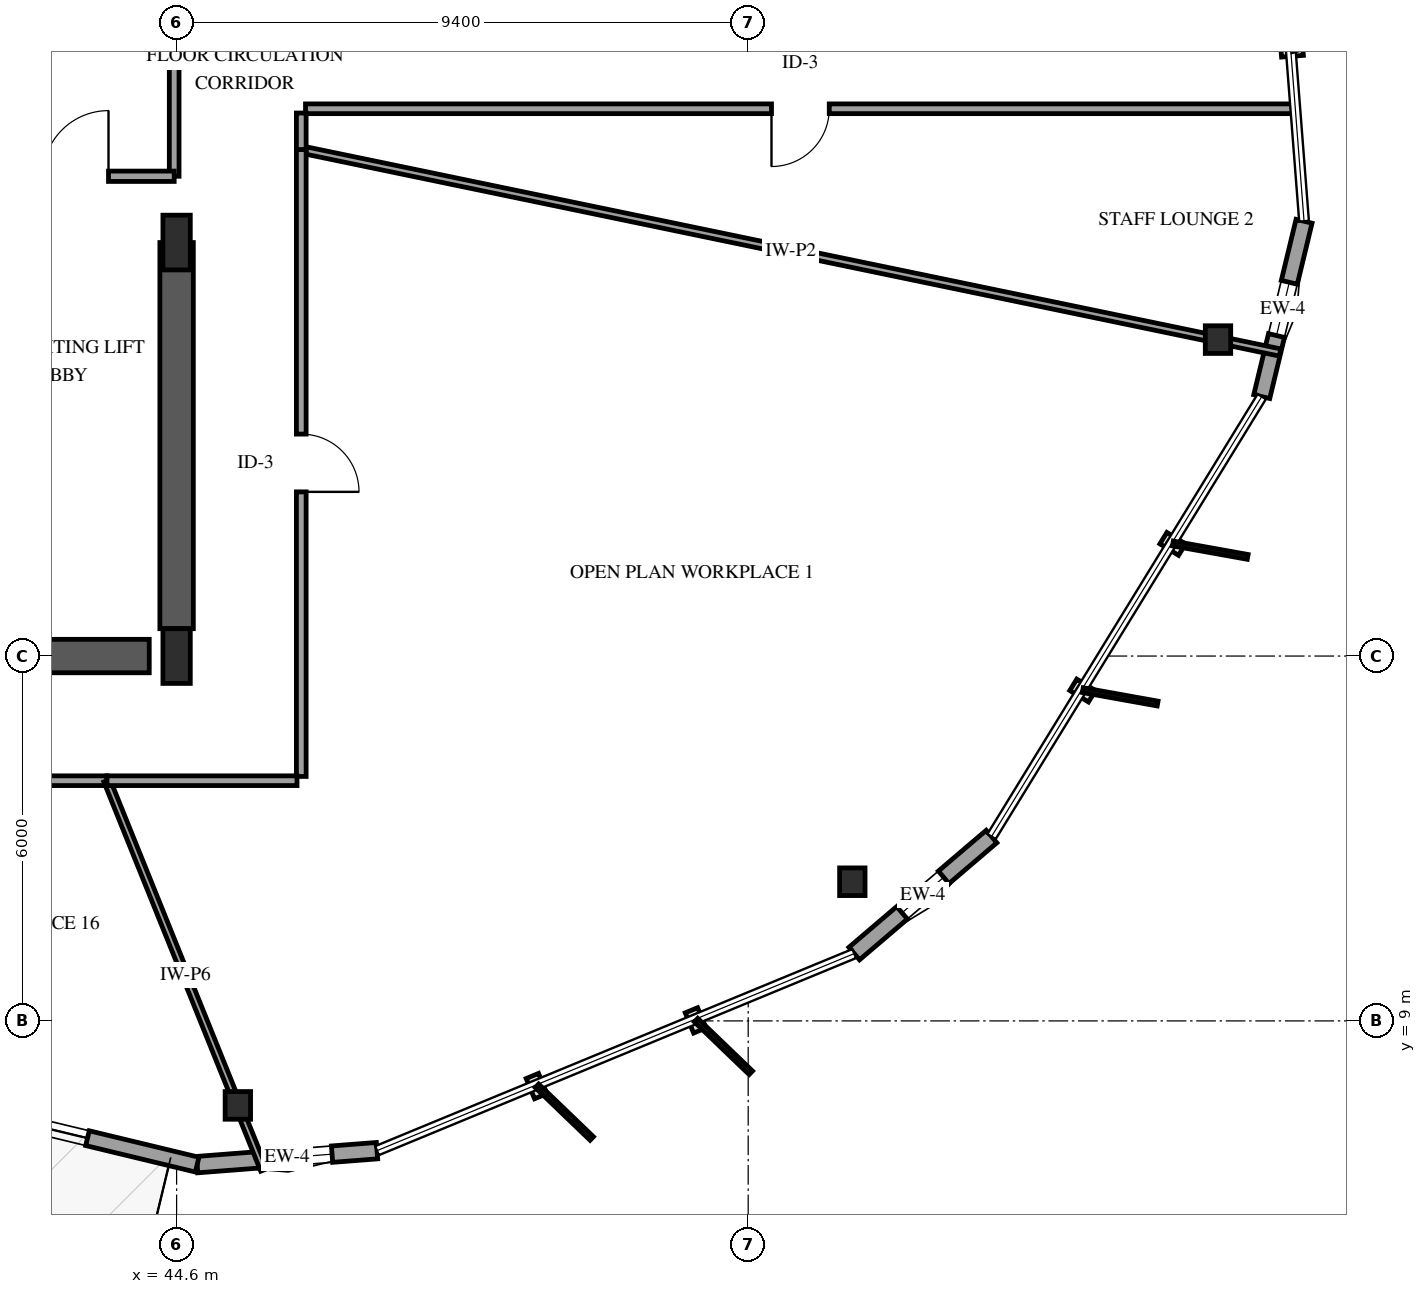
"""IFC4 building model, lengths in metres.
Left out: names, types, materials, properties, quantities, classifications, styles, units other than length and angle.
Written with IfcOpenShell. Run it as: python <this file> out.ifc"""

import sys

from ifc_helpers import new_model, si_unit, direction, frame, frame_2d, origin, origin_2d, place, context, subcontext, project, spatial, rectangle, i_section, extrude, element, fill, save


model = new_model("IFC4")
c1 = context("Model", 3, precision=1e-05, world=origin(), true_north=direction((0.0, 1.0)))
c2 = subcontext(c1, "Body", "Model", "MODEL_VIEW")
j1 = project(units=[si_unit("LENGTHUNIT", "METRE"), si_unit("PLANEANGLEUNIT", "RADIAN")], contexts=[c1])
p1 = place(None, origin())
s1 = spatial("IfcSite", under=j1, at=p1, CompositionType="ELEMENT")
p2 = place(p1, origin())
s2 = spatial("IfcBuilding", under=s1, at=p2, CompositionType="ELEMENT")
p3 = place(p2, frame((0.0, 0.0, 114.7)))
s3 = spatial("IfcBuildingStorey", under=s2, at=p3, CompositionType="ELEMENT", Elevation=114.7)
p4 = place(p3, frame((41.3, 15.0, 0.0), z_axis=(0.0, 0.0, 1.0), x_axis=(1.0, 0.0, 0.0)))
e1 = element("IfcWall", 1, at=p4, inside=s3, PredefinedType="SHEAR", context=c2, shape_type="SweptSolid", body=[
    extrude(rectangle(XDim=2.85, YDim=0.55, at=frame_2d((1.425, 0.0))), origin(), (0.0, 0.0, 1.0), 3.9),
])
p5 = place(p3, frame((44.6, 15.45, 0.0), z_axis=(0.0, 0.0, 1.0), x_axis=(0.0, 1.0, 0.0)))
e2 = element("IfcWall", 2, at=p5, inside=s3, PredefinedType="SHEAR", context=c2, shape_type="SweptSolid", body=[
    extrude(rectangle(XDim=6.35, YDim=0.55, at=frame_2d((3.175, 0.0))), origin(), (0.0, 0.0, 1.0), 3.9),
])
for number, where, z_axis, x_axis in (
    (3, (44.6, 15.0, 0.0), (0.0, 0.0, 1.0), (1.0, 0.0, 0.0)),
    (4, (44.6, 21.8, 0.0), (0.0, 0.0, 1.0), (1.0, 0.0, 0.0)),
):
    element("IfcColumn", number, at=place(p3, frame(where, z_axis=z_axis, x_axis=x_axis)), inside=s3, PredefinedType="PILASTER", context=c2, shape_type="SweptSolid", body=[
        extrude(rectangle(XDim=0.45, YDim=0.9, at=origin_2d()), origin(), (0.0, 0.0, 1.0), 3.9),
    ])
for number, where, z_axis, x_axis in (
    (5, (45.607, 7.611, 0.0), (0.0, 0.0, 1.0), (1.0, 0.0, 0.0)),
    (6, (55.712, 11.289, 0.0), (0.0, 0.0, 1.0), (1.0, 0.0, 0.0)),
    (7, (61.726, 20.204, 0.0), (0.0, 0.0, 1.0), (1.0, 0.0, 0.0)),
):
    element("IfcColumn", number, at=place(p3, frame(where, z_axis=z_axis, x_axis=x_axis)), inside=s3, PredefinedType="COLUMN", context=c2, shape_type="SweptSolid", body=[
        extrude(i_section(OverallWidth=0.418, OverallDepth=0.455, WebThickness=0.042, FlangeThickness=0.068, FilletRadius=0.038, at=origin_2d()), origin(), (0.0, 0.0, 1.0), 3.9),
    ])
p6 = place(p3, frame((44.938, 6.636, 0.0), z_axis=(0.0, 0.0, 1.0), x_axis=(0.99699708695, 0.077439063873, 0.0)))
e8 = element("IfcWall", 8, at=p6, inside=s3, PredefinedType="SOLIDWALL", context=c2, shape_type="SweptSolid", body=[
    extrude(rectangle(XDim=2.967, YDim=0.27, at=frame_2d((1.483, 0.0))), origin(), (0.0, 0.0, 1.0), 2.979),
])
p7 = place(p6, frame((1.325, 0.0, 0.75)))
e9 = element("IfcOpeningElement", 9, at=p7, cuts=e8, PredefinedType="OPENING", context=c2, shape_type="SweptSolid", body=[
    extrude(rectangle(XDim=0.9, YDim=1.5, at=frame_2d((0.45, 0.75))), frame((0.0, 0.145, 0.0), z_axis=(0.0, -1.0, 0.0), x_axis=(1.0, 0.0, 0.0)), (0.0, 0.0, 1.0), 0.29),
])
p8 = place(p3, frame((36.684, 8.627, 0.0), z_axis=(0.0, 0.0, 1.0), x_axis=(0.972125162173, -0.234462511014, 0.0)))
e10 = element("IfcWall", 10, at=p8, inside=s3, PredefinedType="SOLIDWALL", context=c2, shape_type="SweptSolid", body=[
    extrude(rectangle(XDim=8.49, YDim=0.25, at=frame_2d((4.245, 0.0))), origin(), (0.0, 0.0, 1.0), 2.979),
])
p9 = place(p8, frame((3.745, 0.0, 0.0)))
e11 = element("IfcOpeningElement", 11, at=p9, cuts=e10, PredefinedType="OPENING", context=c2, shape_type="SweptSolid", body=[
    extrude(rectangle(XDim=1.05, YDim=2.15, at=frame_2d((0.525, 1.075))), frame((0.0, 0.135, 0.0), z_axis=(0.0, -1.0, 0.0), x_axis=(1.0, 0.0, 0.0)), (0.0, 0.0, 1.0), 0.27),
])
p10 = place(p8, frame((0.44, 0.0, 0.72)))
e12 = element("IfcOpeningElement", 12, at=p10, cuts=e10, PredefinedType="OPENING", context=c2, shape_type="SweptSolid", body=[
    extrude(rectangle(XDim=1.2, YDim=1.6, at=frame_2d((0.6, 0.8))), frame((0.0, 0.135, 0.0), z_axis=(0.0, -1.0, 0.0), x_axis=(1.0, 0.0, 0.0)), (0.0, 0.0, 1.0), 0.27),
])
p11 = place(p8, frame((5.435, 0.0, 0.72)))
e13 = element("IfcOpeningElement", 13, at=p11, cuts=e10, PredefinedType="OPENING", context=c2, shape_type="SweptSolid", body=[
    extrude(rectangle(XDim=1.2, YDim=1.6, at=frame_2d((0.6, 0.8))), frame((0.0, 0.135, 0.0), z_axis=(0.0, -1.0, 0.0), x_axis=(1.0, 0.0, 0.0)), (0.0, 0.0, 1.0), 0.27),
])
p12 = place(p3, frame((55.744, 10.107, 0.0), z_axis=(0.0, 0.0, 1.0), x_axis=(0.761118325799, 0.648613054241, 0.0)))
e14 = element("IfcWall", 14, at=p12, inside=s3, PredefinedType="SOLIDWALL", context=c2, shape_type="SweptSolid", body=[
    extrude(rectangle(XDim=2.967, YDim=0.27, at=frame_2d((1.483, 0.0))), origin(), (0.0, 0.0, 1.0), 2.979),
])
p13 = place(p12, frame((1.033, 0.0, 0.75)))
e15 = element("IfcOpeningElement", 15, at=p13, cuts=e14, PredefinedType="OPENING", context=c2, shape_type="SweptSolid", body=[
    extrude(rectangle(XDim=0.9, YDim=1.5, at=frame_2d((0.45, 0.75))), frame((0.0, 0.145, 0.0), z_axis=(0.0, -1.0, 0.0), x_axis=(1.0, 0.0, 0.0)), (0.0, 0.0, 1.0), 0.29),
])
p14 = place(p3, frame((62.446, 19.267, 0.0), z_axis=(0.0, 0.0, 1.0), x_axis=(0.234471584184, 0.97212297381, 0.0)))
e16 = element("IfcWall", 16, at=p14, inside=s3, PredefinedType="SOLIDWALL", context=c2, shape_type="SweptSolid", body=[
    extrude(rectangle(XDim=2.967, YDim=0.27, at=frame_2d((1.483, 0.0))), origin(), (0.0, 0.0, 1.0), 2.979),
])
p15 = place(p14, frame((1.033, 0.0, 0.75)))
e17 = element("IfcOpeningElement", 17, at=p15, cuts=e16, PredefinedType="OPENING", context=c2, shape_type="SweptSolid", body=[
    extrude(rectangle(XDim=0.9, YDim=1.5, at=frame_2d((0.45, 0.75))), frame((0.0, 0.145, 0.0), z_axis=(0.0, -1.0, 0.0), x_axis=(1.0, 0.0, 0.0)), (0.0, 0.0, 1.0), 0.29),
])
p16 = place(p3, frame((46.65, 23.33, 0.0), z_axis=(0.0, 0.0, 1.0), x_axis=(0.979167554887, -0.203053932386, 0.0)))
e18 = element("IfcWall", 18, at=p16, inside=s3, PredefinedType="PARTITIONING", context=c2, shape_type="SweptSolid", body=[
    extrude(rectangle(XDim=16.44, YDim=0.12, at=frame_2d((8.22, 0.0))), origin(), (0.0, 0.0, 1.0), 2.895),
])
p17 = place(p3, frame((62.997, 24.0, 0.0), z_axis=(0.0, 0.0, 1.0), x_axis=(-1.0, 0.0, 0.0)))
e19 = element("IfcWall", 19, at=p17, inside=s3, PredefinedType="PARTITIONING", context=c2, shape_type="SweptSolid", body=[
    extrude(rectangle(XDim=16.277, YDim=0.16, at=frame_2d((8.139, 0.0))), origin(), (0.0, 0.0, 1.0), 3.6),
])
p18 = place(p17, frame((7.664, 0.0, 0.0)))
e20 = element("IfcOpeningElement", 20, at=p18, cuts=e19, PredefinedType="OPENING", context=c2, shape_type="SweptSolid", body=[
    extrude(rectangle(XDim=0.95, YDim=2.15, at=frame_2d((0.475, 1.075))), frame((0.0, 0.09, 0.0), z_axis=(0.0, -1.0, 0.0), x_axis=(1.0, 0.0, 0.0)), (0.0, 0.0, 1.0), 0.18),
])
p19 = place(p3, frame((46.65, 23.33, 0.0), z_axis=(0.0, 0.0, 1.0), x_axis=(0.0, -1.0, 0.0)))
e21 = element("IfcWall", 21, at=p19, inside=s3, PredefinedType="PARTITIONING", context=c2, shape_type="SweptSolid", body=[
    extrude(rectangle(XDim=10.31, YDim=0.16, at=frame_2d((5.155, 0.0))), origin(), (0.0, 0.0, 1.0), 3.6),
])
p20 = place(p19, frame((4.68, 0.0, 0.0)))
e22 = element("IfcOpeningElement", 22, at=p20, cuts=e21, PredefinedType="OPENING", context=c2, shape_type="SweptSolid", body=[
    extrude(rectangle(XDim=0.95, YDim=2.15, at=frame_2d((0.475, 1.075))), frame((0.0, 0.09, 0.0), z_axis=(0.0, -1.0, 0.0), x_axis=(1.0, 0.0, 0.0)), (0.0, 0.0, 1.0), 0.18),
])
p21 = place(p3, frame((43.455, 12.95, 0.0), z_axis=(0.0, 0.0, 1.0), x_axis=(-1.0, 0.0, 0.0)))
e23 = element("IfcWall", 23, at=p21, inside=s3, PredefinedType="PARTITIONING", context=c2, shape_type="SweptSolid", body=[
    extrude(rectangle(XDim=7.636, YDim=0.16, at=frame_2d((3.818, 0.0))), origin(), (0.0, 0.0, 1.0), 3.6),
])
p22 = place(p21, frame((3.343, 0.0, 0.0)))
e24 = element("IfcOpeningElement", 24, at=p22, cuts=e23, PredefinedType="OPENING", context=c2, shape_type="SweptSolid", body=[
    extrude(rectangle(XDim=0.95, YDim=2.15, at=frame_2d((0.475, 1.075))), frame((0.0, 0.09, 0.0), z_axis=(0.0, -1.0, 0.0), x_axis=(1.0, 0.0, 0.0)), (0.0, 0.0, 1.0), 0.18),
])
p23 = place(p3, frame((44.56, 29.8, 0.0), z_axis=(0.0, 0.0, 1.0), x_axis=(0.0, -1.0, 0.0)))
e25 = element("IfcWall", 25, at=p23, inside=s3, PredefinedType="PARTITIONING", context=c2, shape_type="SweptSolid", body=[
    extrude(rectangle(XDim=6.91, YDim=0.16, at=frame_2d((3.455, 0.0))), origin(), (0.0, 0.0, 1.0), 2.64),
])
p24 = place(p23, frame((2.915, 0.0, 0.0)))
e26 = element("IfcOpeningElement", 26, at=p24, cuts=e25, PredefinedType="OPENING", context=c2, shape_type="SweptSolid", body=[
    extrude(rectangle(XDim=1.08, YDim=2.15, at=frame_2d((0.54, 1.075))), frame((0.0, 0.09, 0.0), z_axis=(0.0, -1.0, 0.0), x_axis=(1.0, 0.0, 0.0)), (0.0, 0.0, 1.0), 0.18),
])
p25 = place(p3, frame((43.455, 12.95, 0.0), z_axis=(0.0, 0.0, 1.0), x_axis=(0.373823057067, -0.927500038817, 0.0)))
e27 = element("IfcWall", 27, at=p25, inside=s3, PredefinedType="PARTITIONING", context=c2, shape_type="SweptSolid", body=[
    extrude(rectangle(XDim=6.901, YDim=0.11, at=frame_2d((3.451, 0.0))), origin(), (0.0, 0.0, 1.0), 2.895),
])
p26 = place(p3, frame((41.32, 22.89, 0.0), z_axis=(0.0, 0.0, 1.0), x_axis=(1.0, 0.0, 0.0)))
e28 = element("IfcWall", 28, at=p26, inside=s3, PredefinedType="PARTITIONING", context=c2, shape_type="SweptSolid", body=[
    extrude(rectangle(XDim=3.24, YDim=0.17, at=frame_2d((1.62, 0.0))), origin(), (0.0, 0.0, 1.0), 3.6),
])
p27 = place(p26, frame((1.08, 0.0, 0.0)))
e29 = element("IfcOpeningElement", 29, at=p27, cuts=e28, PredefinedType="OPENING", context=c2, shape_type="SweptSolid", body=[
    extrude(rectangle(XDim=1.08, YDim=2.15, at=frame_2d((0.54, 1.075))), frame((0.0, 0.095, 0.0), z_axis=(0.0, -1.0, 0.0), x_axis=(1.0, 0.0, 0.0)), (0.0, 0.0, 1.0), 0.19),
])
p28 = place(p3, frame((46.58, 12.95, 0.0), z_axis=(0.0, 0.0, 1.0), x_axis=(-1.0, 0.0, 0.0)))
e30 = element("IfcWall", 30, at=p28, inside=s3, PredefinedType="PARTITIONING", context=c2, shape_type="SweptSolid", body=[
    extrude(rectangle(XDim=3.125, YDim=0.16, at=frame_2d((1.562, 0.0))), origin(), (0.0, 0.0, 1.0), 3.6),
])
p29 = place(p3, frame((46.65, 23.93, 0.0), z_axis=(0.0, 0.0, 1.0), x_axis=(0.0, -1.0, 0.0)))
e31 = element("IfcWall", 31, at=p29, inside=s3, PredefinedType="PARTITIONING", context=c2, shape_type="SweptSolid", body=[
    extrude(rectangle(XDim=0.6, YDim=0.16, at=frame_2d((0.3, 0.0))), origin(), (0.0, 0.0, 1.0), 3.6),
])
p30 = place(p7, origin())
e32 = element("IfcWindow", 32, at=p30, inside=s3, PartitioningType="SINGLE_PANEL", PredefinedType="WINDOW", context=c2, shape_type="SweptSolid", body=[
    extrude(rectangle(XDim=0.9, YDim=1.5, at=frame_2d((0.45, 0.75))), frame((0.0, 0.03, 0.0), z_axis=(0.0, -1.0, 0.0), x_axis=(1.0, 0.0, 0.0)), (0.0, 0.0, 1.0), 0.06),
])
fill(e9, e32)
p31 = place(p11, origin())
e33 = element("IfcWindow", 33, at=p31, inside=s3, PartitioningType="SINGLE_PANEL", PredefinedType="WINDOW", context=c2, shape_type="SweptSolid", body=[
    extrude(rectangle(XDim=1.2, YDim=1.6, at=frame_2d((0.6, 0.8))), frame((0.0, 0.03, 0.0), z_axis=(0.0, -1.0, 0.0), x_axis=(1.0, 0.0, 0.0)), (0.0, 0.0, 1.0), 0.06),
])
fill(e13, e33)
p32 = place(p13, origin())
e34 = element("IfcWindow", 34, at=p32, inside=s3, PartitioningType="SINGLE_PANEL", PredefinedType="WINDOW", context=c2, shape_type="SweptSolid", body=[
    extrude(rectangle(XDim=0.9, YDim=1.5, at=frame_2d((0.45, 0.75))), frame((0.0, 0.03, 0.0), z_axis=(0.0, -1.0, 0.0), x_axis=(1.0, 0.0, 0.0)), (0.0, 0.0, 1.0), 0.06),
])
fill(e15, e34)
p33 = place(p15, origin())
e35 = element("IfcWindow", 35, at=p33, inside=s3, PartitioningType="SINGLE_PANEL", PredefinedType="WINDOW", context=c2, shape_type="SweptSolid", body=[
    extrude(rectangle(XDim=0.9, YDim=1.5, at=frame_2d((0.45, 0.75))), frame((0.0, 0.03, 0.0), z_axis=(0.0, -1.0, 0.0), x_axis=(1.0, 0.0, 0.0)), (0.0, 0.0, 1.0), 0.06),
])
fill(e17, e35)
p34 = place(p18, origin())
e36 = element("IfcDoor", 36, at=p34, inside=s3, OperationType="SINGLE_SWING_RIGHT", PredefinedType="DOOR", context=c2, shape_type="SweptSolid", body=[
    extrude(rectangle(XDim=0.95, YDim=2.15, at=frame_2d((0.475, 1.075))), frame((0.0, 0.025, 0.0), z_axis=(0.0, -1.0, 0.0), x_axis=(1.0, 0.0, 0.0)), (0.0, 0.0, 1.0), 0.05),
])
fill(e20, e36)
p35 = place(p20, origin())
e37 = element("IfcDoor", 37, at=p35, inside=s3, OperationType="SINGLE_SWING_RIGHT", PredefinedType="DOOR", context=c2, shape_type="SweptSolid", body=[
    extrude(rectangle(XDim=0.95, YDim=2.15, at=frame_2d((0.475, 1.075))), frame((0.0, 0.025, 0.0), z_axis=(0.0, -1.0, 0.0), x_axis=(1.0, 0.0, 0.0)), (0.0, 0.0, 1.0), 0.05),
])
fill(e22, e37)
p36 = place(p27, origin())
e38 = element("IfcDoor", 38, at=p36, inside=s3, OperationType="SINGLE_SWING_RIGHT", PredefinedType="DOOR", context=c2, shape_type="SweptSolid", body=[
    extrude(rectangle(XDim=1.08, YDim=2.15, at=frame_2d((0.54, 1.075))), frame((0.0, 0.025, 0.0), z_axis=(0.0, -1.0, 0.0), x_axis=(1.0, 0.0, 0.0)), (0.0, 0.0, 1.0), 0.05),
])
fill(e29, e38)
save(model, sys.argv[1])
